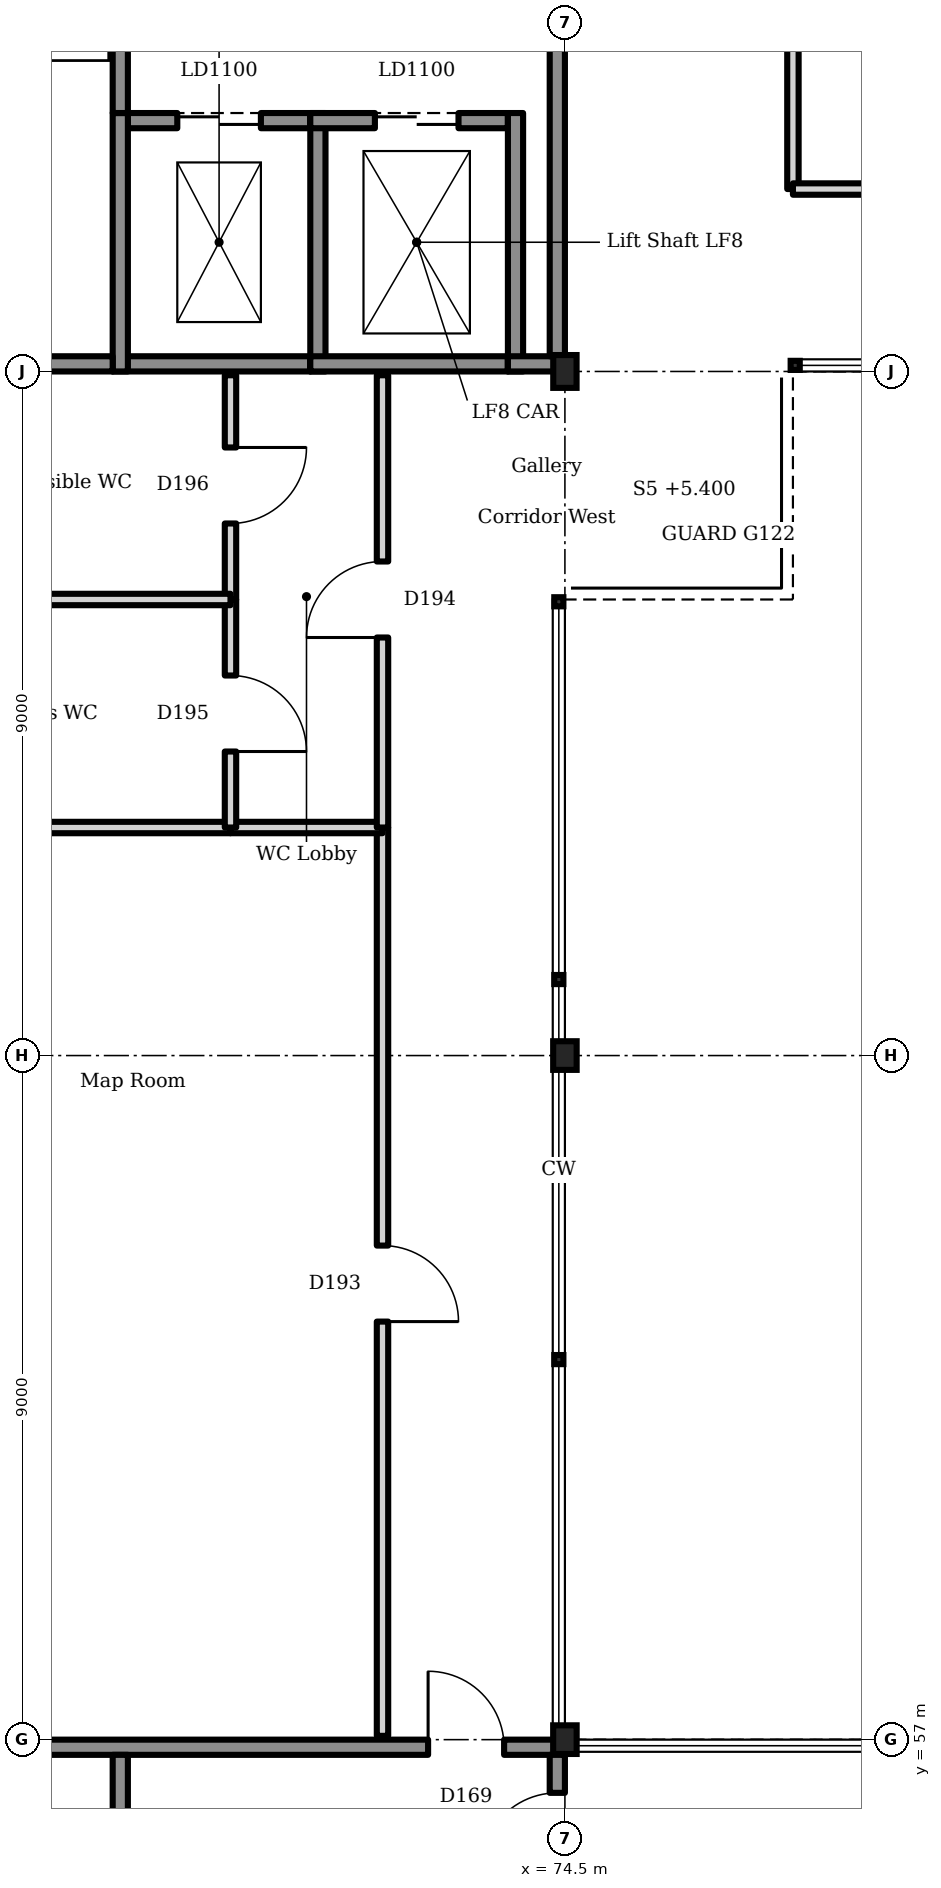
"""IFC4 building model, lengths in metres.
Left out: names, types, materials, properties, quantities, classifications, styles, units other than length and angle.
Written with IfcOpenShell. Run it as: python <this file> out.ifc"""

import sys

from ifc_helpers import new_model, si_unit, direction, frame, frame_2d, origin, origin_2d, place, context, subcontext, project, spatial, rectangle, i_section, extrude, element, fill, save


model = new_model("IFC4")
c1 = context("Model", 3, precision=1e-05, world=origin(), true_north=direction((0.0, 1.0)))
c2 = subcontext(c1, "Body", "Model", "MODEL_VIEW")
j1 = project(units=[si_unit("LENGTHUNIT", "METRE"), si_unit("PLANEANGLEUNIT", "RADIAN")], contexts=[c1])
p1 = place(None, origin())
s1 = spatial("IfcSite", under=j1, at=p1, CompositionType="ELEMENT")
p2 = place(p1, origin())
s2 = spatial("IfcBuilding", under=s1, at=p2, CompositionType="ELEMENT")
p3 = place(p2, frame((0.0, 0.0, 5.4)))
s3 = spatial("IfcBuildingStorey", under=s2, at=p3, CompositionType="ELEMENT", Elevation=5.4)
p4 = place(p3, frame((68.75, 78.3, 0.0), z_axis=(0.0, 0.0, 1.0), x_axis=(1.0, 0.0, 0.0)))
e1 = element("IfcWall", 1, at=p4, inside=s3, PredefinedType="SOLIDWALL", context=c2, shape_type="SweptSolid", body=[
    extrude(rectangle(XDim=2.4, YDim=0.2, at=frame_2d((1.2, 0.0))), origin(), (0.0, 0.0, 1.0), 4.5),
])
p5 = place(p4, frame((0.65, 0.0, 0.0)))
e2 = element("IfcOpeningElement", 2, at=p5, cuts=e1, PredefinedType="OPENING", context=c2, shape_type="SweptSolid", body=[
    extrude(rectangle(XDim=1.1, YDim=2.1, at=frame_2d((0.55, 1.05))), frame((0.0, 0.11, 0.0), z_axis=(0.0, -1.0, 0.0), x_axis=(1.0, 0.0, 0.0)), (0.0, 0.0, 1.0), 0.22),
])
p6 = place(p3, frame((68.55, 75.1, 0.0), z_axis=(0.0, 0.0, 1.0), x_axis=(1.0, 0.0, 0.0)))
e3 = element("IfcWall", 3, at=p6, inside=s3, PredefinedType="SOLIDWALL", context=c2, shape_type="SweptSolid", body=[
    extrude(rectangle(XDim=2.6, YDim=0.2, at=frame_2d((1.3, 0.0))), origin(), (0.0, 0.0, 1.0), 4.5),
])
for number, where, z_axis, x_axis in (
    (4, (68.65, 75.0, 0.0), (0.0, 0.0, 1.0), (0.0, 1.0, 0.0)),
    (5, (71.25, 75.0, 0.0), (0.0, 0.0, 1.0), (0.0, 1.0, 0.0)),
):
    element("IfcWall", number, at=place(p3, frame(where, z_axis=z_axis, x_axis=x_axis)), inside=s3, PredefinedType="SOLIDWALL", context=c2, shape_type="SweptSolid", body=[
        extrude(rectangle(XDim=3.4, YDim=0.2, at=frame_2d((1.7, 0.0))), origin(), (0.0, 0.0, 1.0), 4.5),
    ])
p7 = place(p3, frame((71.15, 78.3, 0.0), z_axis=(0.0, 0.0, 1.0), x_axis=(1.0, 0.0, 0.0)))
e6 = element("IfcWall", 6, at=p7, inside=s3, PredefinedType="SOLIDWALL", context=c2, shape_type="SweptSolid", body=[
    extrude(rectangle(XDim=2.6, YDim=0.2, at=frame_2d((1.3, 0.0))), origin(), (0.0, 0.0, 1.0), 4.5),
])
p8 = place(p7, frame((0.85, 0.0, 0.0)))
e7 = element("IfcOpeningElement", 7, at=p8, cuts=e6, PredefinedType="OPENING", context=c2, shape_type="SweptSolid", body=[
    extrude(rectangle(XDim=1.1, YDim=2.1, at=frame_2d((0.55, 1.05))), frame((0.0, 0.11, 0.0), z_axis=(0.0, -1.0, 0.0), x_axis=(1.0, 0.0, 0.0)), (0.0, 0.0, 1.0), 0.22),
])
p9 = place(p3, frame((71.15, 75.1, 0.0), z_axis=(0.0, 0.0, 1.0), x_axis=(1.0, 0.0, 0.0)))
e8 = element("IfcWall", 8, at=p9, inside=s3, PredefinedType="SOLIDWALL", context=c2, shape_type="SweptSolid", body=[
    extrude(rectangle(XDim=2.6, YDim=0.2, at=frame_2d((1.3, 0.0))), origin(), (0.0, 0.0, 1.0), 4.5),
])
p10 = place(p3, frame((73.85, 75.0, 0.0), z_axis=(0.0, 0.0, 1.0), x_axis=(0.0, 1.0, 0.0)))
e9 = element("IfcWall", 9, at=p10, inside=s3, PredefinedType="SOLIDWALL", context=c2, shape_type="SweptSolid", body=[
    extrude(rectangle(XDim=3.4, YDim=0.2, at=frame_2d((1.7, 0.0))), origin(), (0.0, 0.0, 1.0), 4.5),
])
for number, where, z_axis, x_axis in (
    (10, (74.5, 57.0, 0.0), (0.0, 0.0, 1.0), (1.0, 0.0, 0.0)),
    (11, (74.5, 66.0, 0.0), (0.0, 0.0, 1.0), (1.0, 0.0, 0.0)),
):
    element("IfcColumn", number, at=place(p3, frame(where, z_axis=z_axis, x_axis=x_axis)), inside=s3, PredefinedType="COLUMN", context=c2, shape_type="SweptSolid", body=[
        extrude(i_section(OverallWidth=0.309, OverallDepth=0.377, WebThickness=0.021, FlangeThickness=0.04, FilletRadius=0.027, at=origin_2d()), origin(), (0.0, 0.0, 1.0), 4.5),
    ])
p11 = place(p3, frame((74.5, 75.0, 0.0), z_axis=(0.0, 0.0, 1.0), x_axis=(1.0, 0.0, 0.0)))
e12 = element("IfcColumn", 12, at=p11, inside=s3, PredefinedType="COLUMN", context=c2, shape_type="SweptSolid", body=[
    extrude(i_section(OverallWidth=0.307, OverallDepth=0.432, WebThickness=0.021, FlangeThickness=0.04, FilletRadius=0.027, at=origin_2d()), origin(), (0.0, 0.0, 1.0), 4.5),
])
p12 = place(p3, frame((65.5, 75.1, 0.0), z_axis=(0.0, 0.0, 1.0), x_axis=(1.0, 0.0, 0.0)))
e13 = element("IfcWall", 13, at=p12, inside=s3, PredefinedType="SHEAR", context=c2, shape_type="SweptSolid", body=[
    extrude(rectangle(XDim=3.05, YDim=0.2, at=frame_2d((1.525, 0.0))), origin(), (0.0, 0.0, 1.0), 4.3),
])
p13 = place(p3, frame((73.75, 75.1, 0.0), z_axis=(0.0, 0.0, 1.0), x_axis=(1.0, 0.0, 0.0)))
e14 = element("IfcWall", 14, at=p13, inside=s3, PredefinedType="SHEAR", context=c2, shape_type="SweptSolid", body=[
    extrude(rectangle(XDim=0.75, YDim=0.2, at=frame_2d((0.375, 0.0))), origin(), (0.0, 0.0, 1.0), 3.75),
])
p14 = place(p3, frame((74.4, 75.2, 0.0), z_axis=(0.0, 0.0, 1.0), x_axis=(0.0, 1.0, 0.0)))
e15 = element("IfcWall", 15, at=p14, inside=s3, PredefinedType="SHEAR", context=c2, shape_type="SweptSolid", body=[
    extrude(rectangle(XDim=8.6, YDim=0.2, at=frame_2d((4.3, 0.0))), origin(), (0.0, 0.0, 1.0), 3.75),
])
p15 = place(p14, frame((4.9, 0.0, 0.0)))
e16 = element("IfcOpeningElement", 16, at=p15, cuts=e15, PredefinedType="OPENING", context=c2, shape_type="SweptSolid", body=[
    extrude(rectangle(XDim=1.8, YDim=2.1, at=frame_2d((0.9, 1.05))), frame((0.0, 0.11, 0.0), z_axis=(0.0, -1.0, 0.0), x_axis=(1.0, 0.0, 0.0)), (0.0, 0.0, 1.0), 0.22),
])
p16 = place(p3, frame((68.65, 78.4, 0.0), z_axis=(0.0, 0.0, 1.0), x_axis=(0.0, 1.0, 0.0)))
e17 = element("IfcWall", 17, at=p16, inside=s3, PredefinedType="SHEAR", context=c2, shape_type="SweptSolid", body=[
    extrude(rectangle(XDim=5.4, YDim=0.2, at=frame_2d((2.7, 0.0))), origin(), (0.0, 0.0, 1.0), 4.3),
])
p17 = place(p16, frame((4.1, 0.0, 0.0)))
e18 = element("IfcOpeningElement", 18, at=p17, cuts=e17, PredefinedType="OPENING", context=c2, shape_type="SweptSolid", body=[
    extrude(rectangle(XDim=1.0, YDim=2.1, at=frame_2d((0.5, 1.05))), frame((0.0, 0.11, 0.0), z_axis=(0.0, -1.0, 0.0), x_axis=(1.0, 0.0, 0.0)), (0.0, 0.0, 1.0), 0.22),
])
p18 = place(p3, frame((65.5, 56.9, 0.0), z_axis=(0.0, 0.0, 1.0), x_axis=(1.0, 0.0, 0.0)))
e19 = element("IfcWall", 19, at=p18, inside=s3, PredefinedType="SHEAR", context=c2, shape_type="SweptSolid", body=[
    extrude(rectangle(XDim=9.0, YDim=0.2, at=frame_2d((4.5, 0.0))), origin(), (0.0, 0.0, 1.0), 4.25),
])
p19 = place(p18, frame((7.2, 0.0, 0.0)))
e20 = element("IfcOpeningElement", 20, at=p19, cuts=e19, PredefinedType="OPENING", context=c2, shape_type="SweptSolid", body=[
    extrude(rectangle(XDim=1.0, YDim=2.1, at=frame_2d((0.5, 1.05))), frame((0.0, 0.11, 0.0), z_axis=(0.0, -1.0, 0.0), x_axis=(1.0, 0.0, 0.0)), (0.0, 0.0, 1.0), 0.22),
])
p20 = place(p3, frame((74.4, 48.15, 0.0), z_axis=(0.0, 0.0, 1.0), x_axis=(0.0, 1.0, 0.0)))
e21 = element("IfcWall", 21, at=p20, inside=s3, PredefinedType="SHEAR", context=c2, shape_type="SweptSolid", body=[
    extrude(rectangle(XDim=8.65, YDim=0.2, at=frame_2d((4.325, 0.0))), origin(), (0.0, 0.0, 1.0), 3.8),
])
p21 = place(p20, frame((7.15, 0.0, 0.0)))
e22 = element("IfcOpeningElement", 22, at=p21, cuts=e21, PredefinedType="OPENING", context=c2, shape_type="SweptSolid", body=[
    extrude(rectangle(XDim=1.0, YDim=2.1, at=frame_2d((0.5, 1.05))), frame((0.0, 0.11, 0.0), z_axis=(0.0, -1.0, 0.0), x_axis=(1.0, 0.0, 0.0)), (0.0, 0.0, 1.0), 0.22),
])
p22 = place(p3, frame((68.65, 48.15, 0.0), z_axis=(0.0, 0.0, 1.0), x_axis=(0.0, 1.0, 0.0)))
e23 = element("IfcWall", 23, at=p22, inside=s3, PredefinedType="SHEAR", context=c2, shape_type="SweptSolid", body=[
    extrude(rectangle(XDim=8.65, YDim=0.2, at=frame_2d((4.325, 0.0))), origin(), (0.0, 0.0, 1.0), 4.25),
])
p23 = place(p22, frame((0.35, 0.0, 0.0)))
e24 = element("IfcOpeningElement", 24, at=p23, cuts=e23, PredefinedType="OPENING", context=c2, shape_type="SweptSolid", body=[
    extrude(rectangle(XDim=1.0, YDim=2.1, at=frame_2d((0.5, 1.05))), frame((0.0, 0.11, 0.0), z_axis=(0.0, -1.0, 0.0), x_axis=(1.0, 0.0, 0.0)), (0.0, 0.0, 1.0), 0.22),
])
p24 = place(p3, frame((77.5, 77.4, 0.0), z_axis=(0.0, 0.0, 1.0), x_axis=(0.0, 1.0, 0.0)))
e25 = element("IfcWall", 25, at=p24, inside=s3, PredefinedType="PARTITIONING", context=c2, shape_type="SweptSolid", body=[
    extrude(rectangle(XDim=6.55, YDim=0.15, at=frame_2d((3.275, 0.0))), origin(), (0.0, 0.0, 1.0), 3.7),
])
p25 = place(p3, frame((77.5, 77.4, 0.0), z_axis=(0.0, 0.0, 1.0), x_axis=(1.0, 0.0, 0.0)))
e26 = element("IfcWall", 26, at=p25, inside=s3, PredefinedType="PARTITIONING", context=c2, shape_type="SweptSolid", body=[
    extrude(rectangle(XDim=21.0, YDim=0.15, at=frame_2d((10.5, 0.0))), origin(), (0.0, 0.0, 1.0), 3.7),
])
p26 = place(p25, frame((4.75, 0.0, 0.0)))
e27 = element("IfcOpeningElement", 27, at=p26, cuts=e26, PredefinedType="OPENING", context=c2, shape_type="SweptSolid", body=[
    extrude(rectangle(XDim=1.0, YDim=2.1, at=frame_2d((0.5, 1.05))), frame((0.0, 0.085, 0.0), z_axis=(0.0, -1.0, 0.0), x_axis=(1.0, 0.0, 0.0)), (0.0, 0.0, 1.0), 0.17),
])
p27 = place(p25, frame((15.25, 0.0, 0.0)))
e28 = element("IfcOpeningElement", 28, at=p27, cuts=e26, PredefinedType="OPENING", context=c2, shape_type="SweptSolid", body=[
    extrude(rectangle(XDim=1.0, YDim=2.1, at=frame_2d((0.5, 1.05))), frame((0.0, 0.085, 0.0), z_axis=(0.0, -1.0, 0.0), x_axis=(1.0, 0.0, 0.0)), (0.0, 0.0, 1.0), 0.17),
])
p28 = place(p3, frame((72.1, 57.05, 0.0), z_axis=(0.0, 0.0, 1.0), x_axis=(0.0, 1.0, 0.0)))
e29 = element("IfcWall", 29, at=p28, inside=s3, PredefinedType="PARTITIONING", context=c2, shape_type="SweptSolid", body=[
    extrude(rectangle(XDim=11.95, YDim=0.15, at=frame_2d((5.975, 0.0))), origin(), (0.0, 0.0, 1.0), 3.7),
])
p29 = place(p28, frame((5.45, 0.0, 0.0)))
e30 = element("IfcOpeningElement", 30, at=p29, cuts=e29, PredefinedType="OPENING", context=c2, shape_type="SweptSolid", body=[
    extrude(rectangle(XDim=1.0, YDim=2.1, at=frame_2d((0.5, 1.05))), frame((0.0, 0.085, 0.0), z_axis=(0.0, -1.0, 0.0), x_axis=(1.0, 0.0, 0.0)), (0.0, 0.0, 1.0), 0.17),
])
p30 = place(p3, frame((70.1, 69.0, 0.0), z_axis=(0.0, 0.0, 1.0), x_axis=(1.0, 0.0, 0.0)))
e31 = element("IfcWall", 31, at=p30, inside=s3, PredefinedType="PARTITIONING", context=c2, shape_type="SweptSolid", body=[
    extrude(rectangle(XDim=2.0, YDim=0.15, at=frame_2d((1.0, 0.0))), origin(), (0.0, 0.0, 1.0), 3.7),
])
p31 = place(p3, frame((65.55, 69.0, 0.0), z_axis=(0.0, 0.0, 1.0), x_axis=(1.0, 0.0, 0.0)))
e32 = element("IfcWall", 32, at=p31, inside=s3, PredefinedType="PARTITIONING", context=c2, shape_type="SweptSolid", body=[
    extrude(rectangle(XDim=4.55, YDim=0.15, at=frame_2d((2.275, 0.0))), origin(), (0.0, 0.0, 1.0), 3.7),
])
p32 = place(p3, frame((72.1, 69.0, 0.0), z_axis=(0.0, 0.0, 1.0), x_axis=(0.0, 1.0, 0.0)))
e33 = element("IfcWall", 33, at=p32, inside=s3, PredefinedType="PARTITIONING", context=c2, shape_type="SweptSolid", body=[
    extrude(rectangle(XDim=5.95, YDim=0.15, at=frame_2d((2.975, 0.0))), origin(), (0.0, 0.0, 1.0), 3.7),
])
p33 = place(p32, frame((2.5, 0.0, 0.0)))
e34 = element("IfcOpeningElement", 34, at=p33, cuts=e33, PredefinedType="OPENING", context=c2, shape_type="SweptSolid", body=[
    extrude(rectangle(XDim=1.0, YDim=2.1, at=frame_2d((0.5, 1.05))), frame((0.0, 0.085, 0.0), z_axis=(0.0, -1.0, 0.0), x_axis=(1.0, 0.0, 0.0)), (0.0, 0.0, 1.0), 0.17),
])
p34 = place(p3, frame((70.1, 72.0, 0.0), z_axis=(0.0, 0.0, 1.0), x_axis=(0.0, 1.0, 0.0)))
e35 = element("IfcWall", 35, at=p34, inside=s3, PredefinedType="PARTITIONING", context=c2, shape_type="SweptSolid", body=[
    extrude(rectangle(XDim=2.95, YDim=0.15, at=frame_2d((1.475, 0.0))), origin(), (0.0, 0.0, 1.0), 3.7),
])
p35 = place(p34, frame((1.0, 0.0, 0.0)))
e36 = element("IfcOpeningElement", 36, at=p35, cuts=e35, PredefinedType="OPENING", context=c2, shape_type="SweptSolid", body=[
    extrude(rectangle(XDim=1.0, YDim=2.1, at=frame_2d((0.5, 1.05))), frame((0.0, 0.085, 0.0), z_axis=(0.0, -1.0, 0.0), x_axis=(1.0, 0.0, 0.0)), (0.0, 0.0, 1.0), 0.17),
])
p36 = place(p3, frame((70.1, 69.0, 0.0), z_axis=(0.0, 0.0, 1.0), x_axis=(0.0, 1.0, 0.0)))
e37 = element("IfcWall", 37, at=p36, inside=s3, PredefinedType="PARTITIONING", context=c2, shape_type="SweptSolid", body=[
    extrude(rectangle(XDim=3.0, YDim=0.15, at=frame_2d((1.5, 0.0))), origin(), (0.0, 0.0, 1.0), 3.7),
])
p37 = place(p36, frame((1.0, 0.0, 0.0)))
e38 = element("IfcOpeningElement", 38, at=p37, cuts=e37, PredefinedType="OPENING", context=c2, shape_type="SweptSolid", body=[
    extrude(rectangle(XDim=1.0, YDim=2.1, at=frame_2d((0.5, 1.05))), frame((0.0, 0.085, 0.0), z_axis=(0.0, -1.0, 0.0), x_axis=(1.0, 0.0, 0.0)), (0.0, 0.0, 1.0), 0.17),
])
p38 = place(p3, frame((65.55, 72.0, 0.0), z_axis=(0.0, 0.0, 1.0), x_axis=(1.0, 0.0, 0.0)))
e39 = element("IfcWall", 39, at=p38, inside=s3, PredefinedType="PARTITIONING", context=c2, shape_type="SweptSolid", body=[
    extrude(rectangle(XDim=4.55, YDim=0.15, at=frame_2d((2.275, 0.0))), origin(), (0.0, 0.0, 1.0), 3.7),
])
p39 = place(p5, origin())
e40 = element("IfcDoor", 40, at=p39, inside=s3, OperationType="SLIDING_TO_LEFT", PredefinedType="DOOR", context=c2, shape_type="SweptSolid", body=[
    extrude(rectangle(XDim=1.1, YDim=2.1, at=frame_2d((0.55, 1.05))), frame((0.0, 0.025, 0.0), z_axis=(0.0, -1.0, 0.0), x_axis=(1.0, 0.0, 0.0)), (0.0, 0.0, 1.0), 0.05),
])
fill(e2, e40)
p40 = place(p8, origin())
e41 = element("IfcDoor", 41, at=p40, inside=s3, OperationType="SLIDING_TO_LEFT", PredefinedType="DOOR", context=c2, shape_type="SweptSolid", body=[
    extrude(rectangle(XDim=1.1, YDim=2.1, at=frame_2d((0.55, 1.05))), frame((0.0, 0.025, 0.0), z_axis=(0.0, -1.0, 0.0), x_axis=(1.0, 0.0, 0.0)), (0.0, 0.0, 1.0), 0.05),
])
fill(e7, e41)
p41 = place(p19, origin())
e42 = element("IfcDoor", 42, at=p41, inside=s3, OperationType="SINGLE_SWING_RIGHT", PredefinedType="DOOR", context=c2, shape_type="SweptSolid", body=[
    extrude(rectangle(XDim=1.0, YDim=2.1, at=frame_2d((0.5, 1.05))), frame((0.0, 0.025, 0.0), z_axis=(0.0, -1.0, 0.0), x_axis=(1.0, 0.0, 0.0)), (0.0, 0.0, 1.0), 0.05),
])
fill(e20, e42)
p42 = place(p21, origin())
e43 = element("IfcDoor", 43, at=p42, inside=s3, OperationType="SINGLE_SWING_RIGHT", PredefinedType="DOOR", context=c2, shape_type="SweptSolid", body=[
    extrude(rectangle(XDim=1.0, YDim=2.1, at=frame_2d((0.5, 1.05))), frame((0.0, 0.025, 0.0), z_axis=(0.0, -1.0, 0.0), x_axis=(1.0, 0.0, 0.0)), (0.0, 0.0, 1.0), 0.05),
])
fill(e22, e43)
p43 = place(p29, frame((1.0, 0.0, 0.0), z_axis=(0.0, 0.0, 1.0), x_axis=(-1.0, 0.0, 0.0)))
e44 = element("IfcDoor", 44, at=p43, inside=s3, OperationType="SINGLE_SWING_LEFT", PredefinedType="DOOR", context=c2, shape_type="SweptSolid", body=[
    extrude(rectangle(XDim=1.0, YDim=2.1, at=frame_2d((0.5, 1.05))), frame((0.0, 0.025, 0.0), z_axis=(0.0, -1.0, 0.0), x_axis=(1.0, 0.0, 0.0)), (0.0, 0.0, 1.0), 0.05),
])
fill(e30, e44)
p44 = place(p33, origin())
e45 = element("IfcDoor", 45, at=p44, inside=s3, OperationType="SINGLE_SWING_RIGHT", PredefinedType="DOOR", context=c2, shape_type="SweptSolid", body=[
    extrude(rectangle(XDim=1.0, YDim=2.1, at=frame_2d((0.5, 1.05))), frame((0.0, 0.025, 0.0), z_axis=(0.0, -1.0, 0.0), x_axis=(1.0, 0.0, 0.0)), (0.0, 0.0, 1.0), 0.05),
])
fill(e34, e45)
p45 = place(p37, frame((1.0, 0.0, 0.0), z_axis=(0.0, 0.0, 1.0), x_axis=(-1.0, 0.0, 0.0)))
e46 = element("IfcDoor", 46, at=p45, inside=s3, OperationType="SINGLE_SWING_LEFT", PredefinedType="DOOR", context=c2, shape_type="SweptSolid", body=[
    extrude(rectangle(XDim=1.0, YDim=2.1, at=frame_2d((0.5, 1.05))), frame((0.0, 0.025, 0.0), z_axis=(0.0, -1.0, 0.0), x_axis=(1.0, 0.0, 0.0)), (0.0, 0.0, 1.0), 0.05),
])
fill(e38, e46)
p46 = place(p35, frame((1.0, 0.0, 0.0), z_axis=(0.0, 0.0, 1.0), x_axis=(-1.0, 0.0, 0.0)))
e47 = element("IfcDoor", 47, at=p46, inside=s3, OperationType="SINGLE_SWING_RIGHT", PredefinedType="DOOR", context=c2, shape_type="SweptSolid", body=[
    extrude(rectangle(XDim=1.0, YDim=2.1, at=frame_2d((0.5, 1.05))), frame((0.0, 0.025, 0.0), z_axis=(0.0, -1.0, 0.0), x_axis=(1.0, 0.0, 0.0)), (0.0, 0.0, 1.0), 0.05),
])
fill(e36, e47)
save(model, sys.argv[1])
